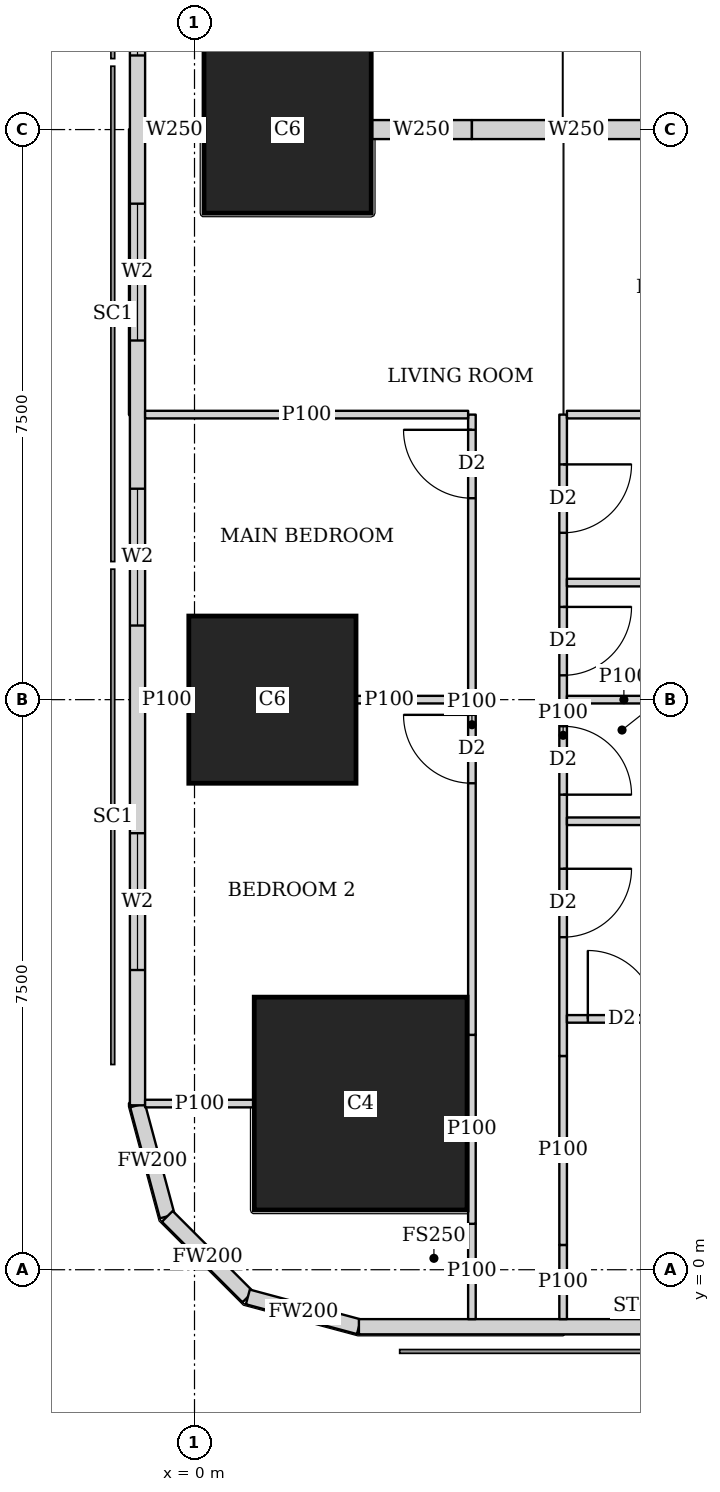
"""IFC4 building model, lengths in metres.
Left out: names, types, materials, properties, quantities, classifications, styles, units other than length and angle.
Written with IfcOpenShell. Run it as: python <this file> out.ifc"""

import sys

from ifc_helpers import new_model, si_unit, direction, frame, frame_2d, origin, origin_2d, place, context, subcontext, project, spatial, rectangle, extrude, element, fill, save


model = new_model("IFC4")
c1 = context("Model", 3, precision=1e-05, world=origin(), true_north=direction((0.0, 1.0)))
c2 = subcontext(c1, "Body", "Model", "MODEL_VIEW")
j1 = project(units=[si_unit("LENGTHUNIT", "METRE"), si_unit("PLANEANGLEUNIT", "RADIAN")], contexts=[c1])
p1 = place(None, origin())
s1 = spatial("IfcSite", under=j1, at=p1, CompositionType="ELEMENT")
p2 = place(p1, origin())
s2 = spatial("IfcBuilding", under=s1, at=p2, CompositionType="ELEMENT")
p3 = place(p2, frame((0.0, 0.0, 122.9)))
s3 = spatial("IfcBuildingStorey", under=s2, at=p3, CompositionType="ELEMENT", Elevation=122.9)
p4 = place(p3, frame((2.186, 2.186, 0.0), z_axis=(0.0, 0.0, 1.0), x_axis=(1.0, 0.0, 0.0)))
e1 = element("IfcColumn", 1, at=p4, inside=s3, PredefinedType="COLUMN", context=c2, shape_type="SweptSolid", body=[
    extrude(rectangle(XDim=2.8, YDim=2.8, at=origin_2d()), origin(), (0.0, 0.0, 1.0), 3.75),
])
for number, where, z_axis, x_axis in (
    (2, (1.025, 7.5, 0.0), (0.0, 0.0, 1.0), (1.0, 0.0, 0.0)),
    (3, (1.225, 15.0, 0.0), (0.0, 0.0, 1.0), (1.0, 0.0, 0.0)),
):
    element("IfcColumn", number, at=place(p3, frame(where, z_axis=z_axis, x_axis=x_axis)), inside=s3, PredefinedType="COLUMN", context=c2, shape_type="SweptSolid", body=[
        extrude(rectangle(XDim=2.2, YDim=2.2, at=origin_2d()), origin(), (0.0, 0.0, 1.0), 3.75),
    ])
p5 = place(p3, frame((2.163, -0.75, 0.0), z_axis=(0.0, 0.0, 1.0), x_axis=(1.0, 0.0, 0.0)))
e4 = element("IfcWall", 4, at=p5, inside=s3, PredefinedType="SOLIDWALL", context=c2, shape_type="SweptSolid", body=[
    extrude(rectangle(XDim=45.628, YDim=0.2, at=frame_2d((22.814, 0.0))), origin(), (0.0, 0.0, 1.0), 3.5),
])
p6 = place(p5, frame((9.537, 0.0, 0.9)))
e5 = element("IfcOpeningElement", 5, at=p6, cuts=e4, PredefinedType="OPENING", context=c2, shape_type="SweptSolid", body=[
    extrude(rectangle(XDim=1.8, YDim=1.5, at=frame_2d((0.9, 0.75))), frame((0.0, 0.11, 0.0), z_axis=(0.0, -1.0, 0.0), x_axis=(1.0, 0.0, 0.0)), (0.0, 0.0, 1.0), 0.22),
])
p7 = place(p5, frame((13.137, 0.0, 0.9)))
e6 = element("IfcOpeningElement", 6, at=p7, cuts=e4, PredefinedType="OPENING", context=c2, shape_type="SweptSolid", body=[
    extrude(rectangle(XDim=1.8, YDim=1.5, at=frame_2d((0.9, 0.75))), frame((0.0, 0.11, 0.0), z_axis=(0.0, -1.0, 0.0), x_axis=(1.0, 0.0, 0.0)), (0.0, 0.0, 1.0), 0.22),
])
p8 = place(p5, frame((16.737, 0.0, 0.9)))
e7 = element("IfcOpeningElement", 7, at=p8, cuts=e4, PredefinedType="OPENING", context=c2, shape_type="SweptSolid", body=[
    extrude(rectangle(XDim=1.8, YDim=1.5, at=frame_2d((0.9, 0.75))), frame((0.0, 0.11, 0.0), z_axis=(0.0, -1.0, 0.0), x_axis=(1.0, 0.0, 0.0)), (0.0, 0.0, 1.0), 0.22),
])
p9 = place(p5, frame((20.337, 0.0, 0.9)))
e8 = element("IfcOpeningElement", 8, at=p9, cuts=e4, PredefinedType="OPENING", context=c2, shape_type="SweptSolid", body=[
    extrude(rectangle(XDim=1.8, YDim=1.5, at=frame_2d((0.9, 0.75))), frame((0.0, 0.11, 0.0), z_axis=(0.0, -1.0, 0.0), x_axis=(1.0, 0.0, 0.0)), (0.0, 0.0, 1.0), 0.22),
])
p10 = place(p5, frame((23.937, 0.0, 0.9)))
e9 = element("IfcOpeningElement", 9, at=p10, cuts=e4, PredefinedType="OPENING", context=c2, shape_type="SweptSolid", body=[
    extrude(rectangle(XDim=1.8, YDim=1.5, at=frame_2d((0.9, 0.75))), frame((0.0, 0.11, 0.0), z_axis=(0.0, -1.0, 0.0), x_axis=(1.0, 0.0, 0.0)), (0.0, 0.0, 1.0), 0.22),
])
p11 = place(p5, frame((27.537, 0.0, 0.9)))
e10 = element("IfcOpeningElement", 10, at=p11, cuts=e4, PredefinedType="OPENING", context=c2, shape_type="SweptSolid", body=[
    extrude(rectangle(XDim=1.8, YDim=1.5, at=frame_2d((0.9, 0.75))), frame((0.0, 0.11, 0.0), z_axis=(0.0, -1.0, 0.0), x_axis=(1.0, 0.0, 0.0)), (0.0, 0.0, 1.0), 0.22),
])
p12 = place(p5, frame((31.137, 0.0, 0.9)))
e11 = element("IfcOpeningElement", 11, at=p12, cuts=e4, PredefinedType="OPENING", context=c2, shape_type="SweptSolid", body=[
    extrude(rectangle(XDim=1.8, YDim=1.5, at=frame_2d((0.9, 0.75))), frame((0.0, 0.11, 0.0), z_axis=(0.0, -1.0, 0.0), x_axis=(1.0, 0.0, 0.0)), (0.0, 0.0, 1.0), 0.22),
])
p13 = place(p5, frame((34.737, 0.0, 0.9)))
e12 = element("IfcOpeningElement", 12, at=p13, cuts=e4, PredefinedType="OPENING", context=c2, shape_type="SweptSolid", body=[
    extrude(rectangle(XDim=1.8, YDim=1.5, at=frame_2d((0.9, 0.75))), frame((0.0, 0.11, 0.0), z_axis=(0.0, -1.0, 0.0), x_axis=(1.0, 0.0, 0.0)), (0.0, 0.0, 1.0), 0.22),
])
p14 = place(p3, frame((-0.75, 42.837, 0.0), z_axis=(0.0, 0.0, 1.0), x_axis=(0.0, -1.0, 0.0)))
e13 = element("IfcWall", 13, at=p14, inside=s3, PredefinedType="SOLIDWALL", context=c2, shape_type="SweptSolid", body=[
    extrude(rectangle(XDim=40.674, YDim=0.2, at=frame_2d((20.337, 0.0))), origin(), (0.0, 0.0, 1.0), 3.5),
])
p15 = place(p14, frame((1.78, 0.0, 0.9)))
e14 = element("IfcOpeningElement", 14, at=p15, cuts=e13, PredefinedType="OPENING", context=c2, shape_type="SweptSolid", body=[
    extrude(rectangle(XDim=1.8, YDim=1.5, at=frame_2d((0.9, 0.75))), frame((0.0, 0.11, 0.0), z_axis=(0.0, -1.0, 0.0), x_axis=(1.0, 0.0, 0.0)), (0.0, 0.0, 1.0), 0.22),
])
p16 = place(p14, frame((6.312, 0.0, 0.9)))
e15 = element("IfcOpeningElement", 15, at=p16, cuts=e13, PredefinedType="OPENING", context=c2, shape_type="SweptSolid", body=[
    extrude(rectangle(XDim=1.8, YDim=1.5, at=frame_2d((0.9, 0.75))), frame((0.0, 0.11, 0.0), z_axis=(0.0, -1.0, 0.0), x_axis=(1.0, 0.0, 0.0)), (0.0, 0.0, 1.0), 0.22),
])
p17 = place(p14, frame((10.062, 0.0, 0.9)))
e16 = element("IfcOpeningElement", 16, at=p17, cuts=e13, PredefinedType="OPENING", context=c2, shape_type="SweptSolid", body=[
    extrude(rectangle(XDim=1.8, YDim=1.5, at=frame_2d((0.9, 0.75))), frame((0.0, 0.11, 0.0), z_axis=(0.0, -1.0, 0.0), x_axis=(1.0, 0.0, 0.0)), (0.0, 0.0, 1.0), 0.22),
])
p18 = place(p14, frame((13.812, 0.0, 0.9)))
e17 = element("IfcOpeningElement", 17, at=p18, cuts=e13, PredefinedType="OPENING", context=c2, shape_type="SweptSolid", body=[
    extrude(rectangle(XDim=1.8, YDim=1.5, at=frame_2d((0.9, 0.75))), frame((0.0, 0.11, 0.0), z_axis=(0.0, -1.0, 0.0), x_axis=(1.0, 0.0, 0.0)), (0.0, 0.0, 1.0), 0.22),
])
p19 = place(p14, frame((17.562, 0.0, 0.9)))
e18 = element("IfcOpeningElement", 18, at=p19, cuts=e13, PredefinedType="OPENING", context=c2, shape_type="SweptSolid", body=[
    extrude(rectangle(XDim=1.8, YDim=1.5, at=frame_2d((0.9, 0.75))), frame((0.0, 0.11, 0.0), z_axis=(0.0, -1.0, 0.0), x_axis=(1.0, 0.0, 0.0)), (0.0, 0.0, 1.0), 0.22),
])
p20 = place(p14, frame((21.312, 0.0, 0.9)))
e19 = element("IfcOpeningElement", 19, at=p20, cuts=e13, PredefinedType="OPENING", context=c2, shape_type="SweptSolid", body=[
    extrude(rectangle(XDim=1.8, YDim=1.5, at=frame_2d((0.9, 0.75))), frame((0.0, 0.11, 0.0), z_axis=(0.0, -1.0, 0.0), x_axis=(1.0, 0.0, 0.0)), (0.0, 0.0, 1.0), 0.22),
])
p21 = place(p14, frame((25.062, 0.0, 0.9)))
e20 = element("IfcOpeningElement", 20, at=p21, cuts=e13, PredefinedType="OPENING", context=c2, shape_type="SweptSolid", body=[
    extrude(rectangle(XDim=1.8, YDim=1.5, at=frame_2d((0.9, 0.75))), frame((0.0, 0.11, 0.0), z_axis=(0.0, -1.0, 0.0), x_axis=(1.0, 0.0, 0.0)), (0.0, 0.0, 1.0), 0.22),
])
p22 = place(p14, frame((28.812, 0.0, 0.9)))
e21 = element("IfcOpeningElement", 21, at=p22, cuts=e13, PredefinedType="OPENING", context=c2, shape_type="SweptSolid", body=[
    extrude(rectangle(XDim=1.8, YDim=1.5, at=frame_2d((0.9, 0.75))), frame((0.0, 0.11, 0.0), z_axis=(0.0, -1.0, 0.0), x_axis=(1.0, 0.0, 0.0)), (0.0, 0.0, 1.0), 0.22),
])
p23 = place(p14, frame((32.562, 0.0, 0.9)))
e22 = element("IfcOpeningElement", 22, at=p23, cuts=e13, PredefinedType="OPENING", context=c2, shape_type="SweptSolid", body=[
    extrude(rectangle(XDim=1.8, YDim=1.5, at=frame_2d((0.9, 0.75))), frame((0.0, 0.11, 0.0), z_axis=(0.0, -1.0, 0.0), x_axis=(1.0, 0.0, 0.0)), (0.0, 0.0, 1.0), 0.22),
])
p24 = place(p14, frame((37.094, 0.0, 0.9)))
e23 = element("IfcOpeningElement", 23, at=p24, cuts=e13, PredefinedType="OPENING", context=c2, shape_type="SweptSolid", body=[
    extrude(rectangle(XDim=1.8, YDim=1.5, at=frame_2d((0.9, 0.75))), frame((0.0, 0.11, 0.0), z_axis=(0.0, -1.0, 0.0), x_axis=(1.0, 0.0, 0.0)), (0.0, 0.0, 1.0), 0.22),
])
p25 = place(p3, frame((-0.75, 2.163, 0.0), z_axis=(0.0, 0.0, 1.0), x_axis=(0.259168954497, -0.965832000415, 0.0)))
e24 = element("IfcWall", 24, at=p25, inside=s3, PredefinedType="SOLIDWALL", context=c2, shape_type="SweptSolid", body=[
    extrude(rectangle(XDim=1.513, YDim=0.2, at=frame_2d((0.756, 0.0))), origin(), (0.0, 0.0, 1.0), 3.5),
])
p26 = place(p3, frame((-0.358, 0.702, 0.0), z_axis=(0.0, 0.0, 1.0), x_axis=(0.707106781187, -0.707106781187, 0.0)))
e25 = element("IfcWall", 25, at=p26, inside=s3, PredefinedType="SOLIDWALL", context=c2, shape_type="SweptSolid", body=[
    extrude(rectangle(XDim=1.499, YDim=0.2, at=frame_2d((0.75, 0.0))), origin(), (0.0, 0.0, 1.0), 3.5),
])
p27 = place(p3, frame((0.702, -0.358, 0.0), z_axis=(0.0, 0.0, 1.0), x_axis=(0.965832000415, -0.259168954497, 0.0)))
e26 = element("IfcWall", 26, at=p27, inside=s3, PredefinedType="SOLIDWALL", context=c2, shape_type="SweptSolid", body=[
    extrude(rectangle(XDim=1.513, YDim=0.2, at=frame_2d((0.756, 0.0))), origin(), (0.0, 0.0, 1.0), 3.5),
])
p28 = place(p3, frame((3.65, -0.65, 0.0), z_axis=(0.0, 0.0, 1.0), x_axis=(0.0, 1.0, 0.0)))
e27 = element("IfcWall", 27, at=p28, inside=s3, PredefinedType="PARTITIONING", context=c2, shape_type="SweptSolid", body=[
    extrude(rectangle(XDim=1.254, YDim=0.1, at=frame_2d((0.627, 0.0))), origin(), (0.0, 0.0, 1.0), 3.5),
])
p29 = place(p3, frame((3.65, 0.604, 0.0), z_axis=(0.0, 0.0, 1.0), x_axis=(0.0, 1.0, 0.0)))
e28 = element("IfcWall", 28, at=p29, inside=s3, PredefinedType="PARTITIONING", context=c2, shape_type="SweptSolid", body=[
    extrude(rectangle(XDim=2.486, YDim=0.1, at=frame_2d((1.243, 0.0))), origin(), (0.0, 0.0, 1.0), 2.05),
])
p30 = place(p3, frame((3.65, 3.09, 0.0), z_axis=(0.0, 0.0, 1.0), x_axis=(0.0, 1.0, 0.0)))
e29 = element("IfcWall", 29, at=p30, inside=s3, PredefinedType="PARTITIONING", context=c2, shape_type="SweptSolid", body=[
    extrude(rectangle(XDim=8.16, YDim=0.1, at=frame_2d((4.08, 0.0))), origin(), (0.0, 0.0, 1.0), 3.5),
])
p31 = place(p30, frame((7.06, 0.0, 0.0)))
e30 = element("IfcOpeningElement", 30, at=p31, cuts=e29, PredefinedType="OPENING", context=c2, shape_type="SweptSolid", body=[
    extrude(rectangle(XDim=0.9, YDim=2.1, at=frame_2d((0.45, 1.05))), frame((0.0, 0.06, 0.0), z_axis=(0.0, -1.0, 0.0), x_axis=(1.0, 0.0, 0.0)), (0.0, 0.0, 1.0), 0.12),
])
p32 = place(p30, frame((3.31, 0.0, 0.0)))
e31 = element("IfcOpeningElement", 31, at=p32, cuts=e29, PredefinedType="OPENING", context=c2, shape_type="SweptSolid", body=[
    extrude(rectangle(XDim=0.9, YDim=2.1, at=frame_2d((0.45, 1.05))), frame((0.0, 0.06, 0.0), z_axis=(0.0, -1.0, 0.0), x_axis=(1.0, 0.0, 0.0)), (0.0, 0.0, 1.0), 0.12),
])
p33 = place(p3, frame((4.85, -0.65, 0.0), z_axis=(0.0, 0.0, 1.0), x_axis=(0.0, 1.0, 0.0)))
e32 = element("IfcWall", 32, at=p33, inside=s3, PredefinedType="PARTITIONING", context=c2, shape_type="SweptSolid", body=[
    extrude(rectangle(XDim=0.976, YDim=0.1, at=frame_2d((0.488, 0.0))), origin(), (0.0, 0.0, 1.0), 3.5),
])
p34 = place(p3, frame((4.85, 0.326, 0.0), z_axis=(0.0, 0.0, 1.0), x_axis=(0.0, 1.0, 0.0)))
e33 = element("IfcWall", 33, at=p34, inside=s3, PredefinedType="PARTITIONING", context=c2, shape_type="SweptSolid", body=[
    extrude(rectangle(XDim=2.486, YDim=0.1, at=frame_2d((1.243, 0.0))), origin(), (0.0, 0.0, 1.0), 2.05),
])
p35 = place(p3, frame((4.85, 2.812, 0.0), z_axis=(0.0, 0.0, 1.0), x_axis=(0.0, 1.0, 0.0)))
e34 = element("IfcWall", 34, at=p35, inside=s3, PredefinedType="PARTITIONING", context=c2, shape_type="SweptSolid", body=[
    extrude(rectangle(XDim=8.438, YDim=0.1, at=frame_2d((4.219, 0.0))), origin(), (0.0, 0.0, 1.0), 3.5),
])
p36 = place(p35, frame((6.883, 0.0, 0.0)))
e35 = element("IfcOpeningElement", 35, at=p36, cuts=e34, PredefinedType="OPENING", context=c2, shape_type="SweptSolid", body=[
    extrude(rectangle(XDim=0.9, YDim=2.1, at=frame_2d((0.45, 1.05))), frame((0.0, 0.06, 0.0), z_axis=(0.0, -1.0, 0.0), x_axis=(1.0, 0.0, 0.0)), (0.0, 0.0, 1.0), 0.12),
])
p37 = place(p35, frame((3.438, 0.0, 0.0)))
e36 = element("IfcOpeningElement", 36, at=p37, cuts=e34, PredefinedType="OPENING", context=c2, shape_type="SweptSolid", body=[
    extrude(rectangle(XDim=0.9, YDim=2.1, at=frame_2d((0.45, 1.05))), frame((0.0, 0.06, 0.0), z_axis=(0.0, -1.0, 0.0), x_axis=(1.0, 0.0, 0.0)), (0.0, 0.0, 1.0), 0.12),
])
p38 = place(p35, frame((5.008, 0.0, 0.0)))
e37 = element("IfcOpeningElement", 37, at=p38, cuts=e34, PredefinedType="OPENING", context=c2, shape_type="SweptSolid", body=[
    extrude(rectangle(XDim=0.9, YDim=2.1, at=frame_2d((0.45, 1.05))), frame((0.0, 0.06, 0.0), z_axis=(0.0, -1.0, 0.0), x_axis=(1.0, 0.0, 0.0)), (0.0, 0.0, 1.0), 0.12),
])
p39 = place(p35, frame((1.563, 0.0, 0.0)))
e38 = element("IfcOpeningElement", 38, at=p39, cuts=e34, PredefinedType="OPENING", context=c2, shape_type="SweptSolid", body=[
    extrude(rectangle(XDim=0.9, YDim=2.1, at=frame_2d((0.45, 1.05))), frame((0.0, 0.06, 0.0), z_axis=(0.0, -1.0, 0.0), x_axis=(1.0, 0.0, 0.0)), (0.0, 0.0, 1.0), 0.12),
])
p40 = place(p3, frame((-0.65, 2.186, 0.0), z_axis=(0.0, 0.0, 1.0), x_axis=(1.0, 0.0, 0.0)))
e39 = element("IfcWall", 39, at=p40, inside=s3, PredefinedType="PARTITIONING", context=c2, shape_type="SweptSolid", body=[
    extrude(rectangle(XDim=1.435, YDim=0.1, at=frame_2d((0.717, 0.0))), origin(), (0.0, 0.0, 1.0), 3.5),
])
p41 = place(p3, frame((-0.65, 7.5, 0.0), z_axis=(0.0, 0.0, 1.0), x_axis=(1.0, 0.0, 0.0)))
e40 = element("IfcWall", 40, at=p41, inside=s3, PredefinedType="PARTITIONING", context=c2, shape_type="SweptSolid", body=[
    extrude(rectangle(XDim=0.574, YDim=0.1, at=frame_2d((0.287, 0.0))), origin(), (0.0, 0.0, 1.0), 2.05),
])
p42 = place(p3, frame((2.126, 7.5, 0.0), z_axis=(0.0, 0.0, 1.0), x_axis=(1.0, 0.0, 0.0)))
e41 = element("IfcWall", 41, at=p42, inside=s3, PredefinedType="PARTITIONING", context=c2, shape_type="SweptSolid", body=[
    extrude(rectangle(XDim=1.474, YDim=0.1, at=frame_2d((0.737, 0.0))), origin(), (0.0, 0.0, 1.0), 2.05),
])
p43 = place(p3, frame((-0.65, 11.25, 0.0), z_axis=(0.0, 0.0, 1.0), x_axis=(1.0, 0.0, 0.0)))
e42 = element("IfcWall", 42, at=p43, inside=s3, PredefinedType="PARTITIONING", context=c2, shape_type="SweptSolid", body=[
    extrude(rectangle(XDim=4.25, YDim=0.1, at=frame_2d((2.125, 0.0))), origin(), (0.0, 0.0, 1.0), 2.2),
])
p44 = place(p3, frame((4.9, 7.5, 0.0), z_axis=(0.0, 0.0, 1.0), x_axis=(1.0, 0.0, 0.0)))
e43 = element("IfcWall", 43, at=p44, inside=s3, PredefinedType="PARTITIONING", context=c2, shape_type="SweptSolid", body=[
    extrude(rectangle(XDim=1.499, YDim=0.1, at=frame_2d((0.75, 0.0))), origin(), (0.0, 0.0, 1.0), 3.5),
])
for number, where, z_axis, x_axis in (
    (44, (4.9, 11.25, 0.0), (0.0, 0.0, 1.0), (1.0, 0.0, 0.0)),
    (45, (4.9, 9.04, 0.0), (0.0, 0.0, 1.0), (1.0, 0.0, 0.0)),
    (46, (4.9, 5.9, 0.0), (0.0, 0.0, 1.0), (1.0, 0.0, 0.0)),
):
    element("IfcWall", number, at=place(p3, frame(where, z_axis=z_axis, x_axis=x_axis)), inside=s3, PredefinedType="PARTITIONING", context=c2, shape_type="SweptSolid", body=[
        extrude(rectangle(XDim=3.275, YDim=0.1, at=frame_2d((1.638, 0.0))), origin(), (0.0, 0.0, 1.0), 3.5),
    ])
p45 = place(p3, frame((-0.65, 15.0, 0.0), z_axis=(0.0, 0.0, 1.0), x_axis=(1.0, 0.0, 0.0)))
e47 = element("IfcWall", 47, at=p45, inside=s3, PredefinedType="SOLIDWALL", context=c2, shape_type="SweptSolid", body=[
    extrude(rectangle(XDim=0.774, YDim=0.25, at=frame_2d((0.387, 0.0))), origin(), (0.0, 0.0, 1.0), 3.5),
])
p46 = place(p3, frame((2.326, 15.0, 0.0), z_axis=(0.0, 0.0, 1.0), x_axis=(1.0, 0.0, 0.0)))
e48 = element("IfcWall", 48, at=p46, inside=s3, PredefinedType="SOLIDWALL", context=c2, shape_type="SweptSolid", body=[
    extrude(rectangle(XDim=1.324, YDim=0.25, at=frame_2d((0.662, 0.0))), origin(), (0.0, 0.0, 1.0), 3.5),
])
p47 = place(p3, frame((3.65, 15.0, 0.0), z_axis=(0.0, 0.0, 1.0), x_axis=(1.0, 0.0, 0.0)))
e49 = element("IfcWall", 49, at=p47, inside=s3, PredefinedType="SOLIDWALL", context=c2, shape_type="SweptSolid", body=[
    extrude(rectangle(XDim=2.749, YDim=0.25, at=frame_2d((1.375, 0.0))), origin(), (0.0, 0.0, 1.0), 3.5),
])
p48 = place(p3, frame((8.175, 3.3, 0.0), z_axis=(0.0, 0.0, 1.0), x_axis=(-1.0, 0.0, 0.0)))
e50 = element("IfcWall", 50, at=p48, inside=s3, PredefinedType="PARTITIONING", context=c2, shape_type="SweptSolid", body=[
    extrude(rectangle(XDim=3.275, YDim=0.1, at=frame_2d((1.638, 0.0))), origin(), (0.0, 0.0, 1.0), 3.5),
])
p49 = place(p48, frame((2.1, 0.0, 0.0)))
e51 = element("IfcOpeningElement", 51, at=p49, cuts=e50, PredefinedType="OPENING", context=c2, shape_type="SweptSolid", body=[
    extrude(rectangle(XDim=0.9, YDim=2.1, at=frame_2d((0.45, 1.05))), frame((0.0, 0.06, 0.0), z_axis=(0.0, -1.0, 0.0), x_axis=(1.0, 0.0, 0.0)), (0.0, 0.0, 1.0), 0.12),
])
p50 = place(p21, origin())
e52 = element("IfcWindow", 52, at=p50, inside=s3, PartitioningType="SINGLE_PANEL", PredefinedType="WINDOW", context=c2, shape_type="SweptSolid", body=[
    extrude(rectangle(XDim=1.8, YDim=1.5, at=frame_2d((0.9, 0.75))), frame((0.0, 0.03, 0.0), z_axis=(0.0, -1.0, 0.0), x_axis=(1.0, 0.0, 0.0)), (0.0, 0.0, 1.0), 0.06),
])
fill(e20, e52)
p51 = place(p22, origin())
e53 = element("IfcWindow", 53, at=p51, inside=s3, PartitioningType="SINGLE_PANEL", PredefinedType="WINDOW", context=c2, shape_type="SweptSolid", body=[
    extrude(rectangle(XDim=1.8, YDim=1.5, at=frame_2d((0.9, 0.75))), frame((0.0, 0.03, 0.0), z_axis=(0.0, -1.0, 0.0), x_axis=(1.0, 0.0, 0.0)), (0.0, 0.0, 1.0), 0.06),
])
fill(e21, e53)
p52 = place(p23, origin())
e54 = element("IfcWindow", 54, at=p52, inside=s3, PartitioningType="SINGLE_PANEL", PredefinedType="WINDOW", context=c2, shape_type="SweptSolid", body=[
    extrude(rectangle(XDim=1.8, YDim=1.5, at=frame_2d((0.9, 0.75))), frame((0.0, 0.03, 0.0), z_axis=(0.0, -1.0, 0.0), x_axis=(1.0, 0.0, 0.0)), (0.0, 0.0, 1.0), 0.06),
])
fill(e22, e54)
p53 = place(p24, origin())
e55 = element("IfcWindow", 55, at=p53, inside=s3, PartitioningType="SINGLE_PANEL", PredefinedType="WINDOW", context=c2, shape_type="SweptSolid", body=[
    extrude(rectangle(XDim=1.8, YDim=1.5, at=frame_2d((0.9, 0.75))), frame((0.0, 0.03, 0.0), z_axis=(0.0, -1.0, 0.0), x_axis=(1.0, 0.0, 0.0)), (0.0, 0.0, 1.0), 0.06),
])
fill(e23, e55)
p54 = place(p31, origin())
e56 = element("IfcDoor", 56, at=p54, inside=s3, OperationType="SINGLE_SWING_RIGHT", PredefinedType="DOOR", context=c2, shape_type="SweptSolid", body=[
    extrude(rectangle(XDim=0.9, YDim=2.1, at=frame_2d((0.45, 1.05))), frame((0.0, 0.025, 0.0), z_axis=(0.0, -1.0, 0.0), x_axis=(1.0, 0.0, 0.0)), (0.0, 0.0, 1.0), 0.05),
])
fill(e30, e56)
p55 = place(p32, origin())
e57 = element("IfcDoor", 57, at=p55, inside=s3, OperationType="SINGLE_SWING_RIGHT", PredefinedType="DOOR", context=c2, shape_type="SweptSolid", body=[
    extrude(rectangle(XDim=0.9, YDim=2.1, at=frame_2d((0.45, 1.05))), frame((0.0, 0.025, 0.0), z_axis=(0.0, -1.0, 0.0), x_axis=(1.0, 0.0, 0.0)), (0.0, 0.0, 1.0), 0.05),
])
fill(e31, e57)
p56 = place(p36, origin())
e58 = element("IfcDoor", 58, at=p56, inside=s3, OperationType="SINGLE_SWING_LEFT", PredefinedType="DOOR", context=c2, shape_type="SweptSolid", body=[
    extrude(rectangle(XDim=0.9, YDim=2.1, at=frame_2d((0.45, 1.05))), frame((0.0, 0.025, 0.0), z_axis=(0.0, -1.0, 0.0), x_axis=(1.0, 0.0, 0.0)), (0.0, 0.0, 1.0), 0.05),
])
fill(e35, e58)
p57 = place(p37, origin())
e59 = element("IfcDoor", 59, at=p57, inside=s3, OperationType="SINGLE_SWING_RIGHT", PredefinedType="DOOR", context=c2, shape_type="SweptSolid", body=[
    extrude(rectangle(XDim=0.9, YDim=2.1, at=frame_2d((0.45, 1.05))), frame((0.0, 0.025, 0.0), z_axis=(0.0, -1.0, 0.0), x_axis=(1.0, 0.0, 0.0)), (0.0, 0.0, 1.0), 0.05),
])
fill(e36, e59)
p58 = place(p38, origin())
e60 = element("IfcDoor", 60, at=p58, inside=s3, OperationType="SINGLE_SWING_LEFT", PredefinedType="DOOR", context=c2, shape_type="SweptSolid", body=[
    extrude(rectangle(XDim=0.9, YDim=2.1, at=frame_2d((0.45, 1.05))), frame((0.0, 0.025, 0.0), z_axis=(0.0, -1.0, 0.0), x_axis=(1.0, 0.0, 0.0)), (0.0, 0.0, 1.0), 0.05),
])
fill(e37, e60)
p59 = place(p39, origin())
e61 = element("IfcDoor", 61, at=p59, inside=s3, OperationType="SINGLE_SWING_LEFT", PredefinedType="DOOR", context=c2, shape_type="SweptSolid", body=[
    extrude(rectangle(XDim=0.9, YDim=2.1, at=frame_2d((0.45, 1.05))), frame((0.0, 0.025, 0.0), z_axis=(0.0, -1.0, 0.0), x_axis=(1.0, 0.0, 0.0)), (0.0, 0.0, 1.0), 0.05),
])
fill(e38, e61)
p60 = place(p49, origin())
e62 = element("IfcDoor", 62, at=p60, inside=s3, OperationType="SINGLE_SWING_LEFT", PredefinedType="DOOR", context=c2, shape_type="SweptSolid", body=[
    extrude(rectangle(XDim=0.9, YDim=2.1, at=frame_2d((0.45, 1.05))), frame((0.0, 0.025, 0.0), z_axis=(0.0, -1.0, 0.0), x_axis=(1.0, 0.0, 0.0)), (0.0, 0.0, 1.0), 0.05),
])
fill(e51, e62)
save(model, sys.argv[1])
